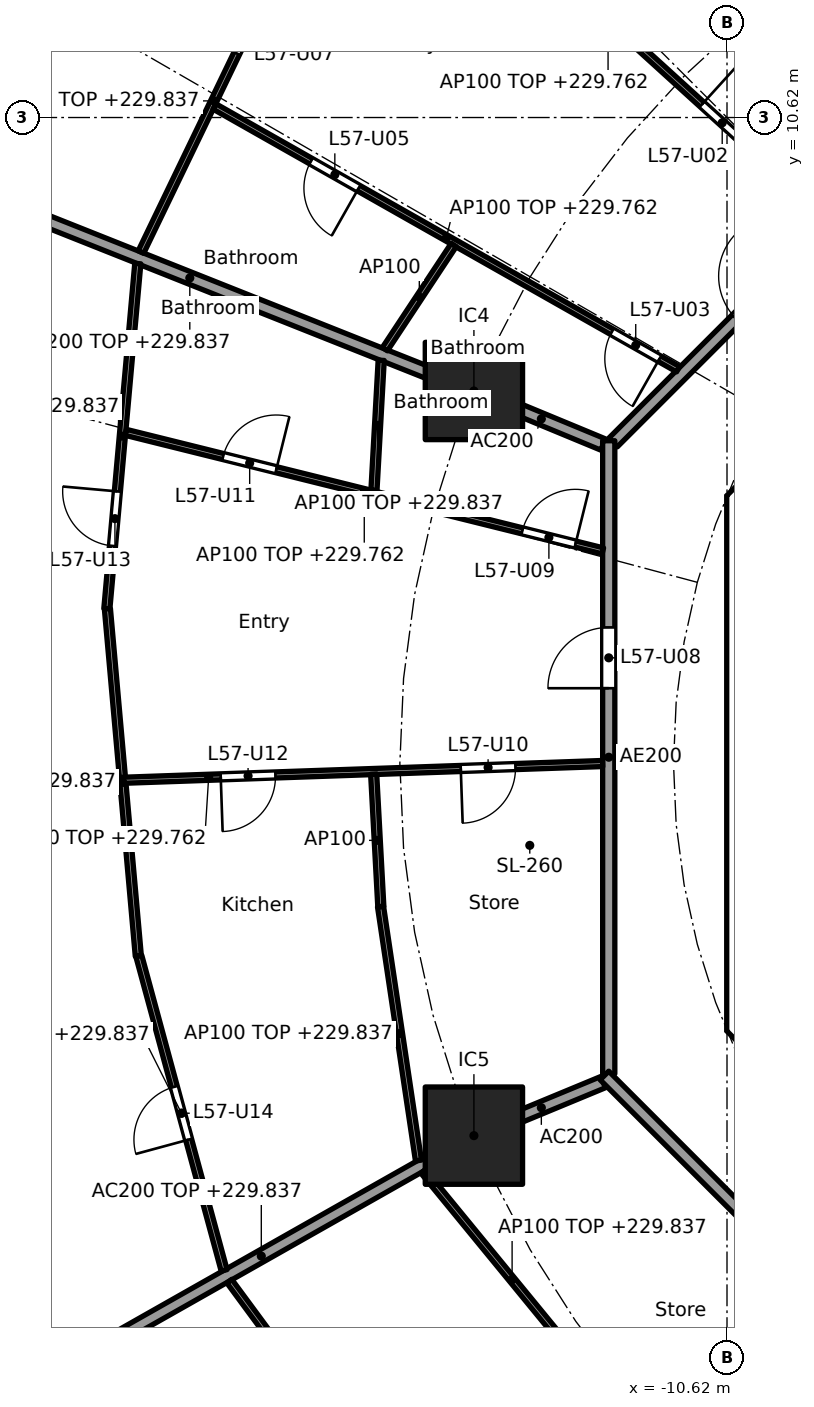
"""IFC4 building model, lengths in metres.
Left out: names, types, materials, properties, quantities, classifications, styles, units other than length and angle.
Written with IfcOpenShell. Run it as: python <this file> out.ifc"""

import sys

from ifc_helpers import new_model, si_unit, direction, frame, frame_2d, origin, origin_2d, place, context, subcontext, project, spatial, polyline, rectangle, outline, extrude, element, fill, save


model = new_model("IFC4")
c1 = context("Model", 3, precision=1e-05, world=origin(), true_north=direction((0.0, 1.0)))
c2 = subcontext(c1, "Body", "Model", "MODEL_VIEW")
j1 = project(units=[si_unit("LENGTHUNIT", "METRE"), si_unit("PLANEANGLEUNIT", "RADIAN")], contexts=[c1])
p1 = place(None, origin())
s1 = spatial("IfcSite", under=j1, at=p1, CompositionType="ELEMENT")
p2 = place(p1, origin())
s2 = spatial("IfcBuilding", under=s1, at=p2, CompositionType="ELEMENT")
p3 = place(p2, frame((0.0, 0.0, 227.0)))
s3 = spatial("IfcBuildingStorey", under=s2, at=p3, CompositionType="ELEMENT", Elevation=227.0)
for number, where, z_axis, x_axis in (
    (1, (-14.782, 6.123, 0.0), (0.0, 0.0, 1.0), (1.0, 0.0, 0.0)),
    (2, (-14.782, -6.123, 0.0), (0.0, 0.0, 1.0), (1.0, 0.0, 0.0)),
):
    element("IfcColumn", number, at=place(p3, frame(where, z_axis=z_axis, x_axis=x_axis)), inside=s3, PredefinedType="COLUMN", context=c2, shape_type="SweptSolid", body=[
        extrude(rectangle(XDim=1.6, YDim=1.6, at=origin_2d()), origin(), (0.0, 0.0, 1.0), 3.7),
    ])
p4 = place(p3, frame((-10.325, 3.801, 0.0), z_axis=(0.0, 0.0, 1.0), x_axis=(0.0, -1.0, 0.0)))
e3 = element("IfcWall", 3, at=p4, inside=s3, PredefinedType="SHEAR", context=c2, shape_type="SweptSolid", body=[
    extrude(rectangle(XDim=7.602, YDim=0.6, at=frame_2d((3.801, 0.0))), origin(), (0.0, 0.0, 1.0), 3.44),
])
p5 = place(p4, frame((0.651, 0.0, 0.0)))
e4 = element("IfcOpeningElement", 4, at=p5, cuts=e3, PredefinedType="OPENING", context=c2, shape_type="SweptSolid", body=[
    extrude(rectangle(XDim=1.5, YDim=2.1, at=frame_2d((0.75, 1.05))), frame((0.0, 0.31, 0.0), z_axis=(0.0, -1.0, 0.0), x_axis=(1.0, 0.0, 0.0)), (0.0, 0.0, 1.0), 0.62),
])
p6 = place(p4, frame((5.451, 0.0, 0.0)))
e5 = element("IfcOpeningElement", 5, at=p6, cuts=e3, PredefinedType="OPENING", context=c2, shape_type="SweptSolid", body=[
    extrude(rectangle(XDim=1.5, YDim=2.1, at=frame_2d((0.75, 1.05))), frame((0.0, 0.31, 0.0), z_axis=(0.0, -1.0, 0.0), x_axis=(1.0, 0.0, 0.0)), (0.0, 0.0, 1.0), 0.62),
])
p7 = place(p3, origin())
e6 = element("IfcWall", 6, at=p7, inside=s3, PredefinedType="SHEAR", context=c2, shape_type="SweptSolid", body=[
    extrude(outline(polyline([(-10.625, -3.801), (-10.025, -3.801), (-10.025, -4.152), (-9.776, -4.401), (-10.2, -4.825), (-10.625, -4.401), (-10.625, -3.801)])), origin(), (0.0, 0.0, 1.0), 3.44),
])
p8 = place(p3, origin())
e7 = element("IfcWall", 7, at=p8, inside=s3, PredefinedType="SHEAR", context=c2, shape_type="SweptSolid", body=[
    extrude(outline(polyline([(-10.2, 4.825), (-9.776, 4.401), (-10.025, 4.152), (-10.025, 3.801), (-10.625, 3.801), (-10.625, 4.401), (-10.2, 4.825)])), origin(), (0.0, 0.0, 1.0), 3.44),
])
p9 = place(p3, frame((-12.657, 5.243, 0.0), z_axis=(0.0, 0.0, 1.0), x_axis=(-0.923859888513, 0.38273085373, 0.0)))
e8 = element("IfcWall", 8, at=p9, inside=s3, PredefinedType="PARTITIONING", context=c2, shape_type="SweptSolid", body=[
    extrude(rectangle(XDim=2.199, YDim=0.2, at=frame_2d((1.1, 0.0))), origin(), (0.0, 0.0, 1.0), 3.44),
])
p10 = place(p3, frame((-14.829, 6.141, 0.0), z_axis=(0.0, 0.0, 1.0), x_axis=(-0.929202069098, 0.36957206981, 0.0)))
e9 = element("IfcWall", 9, at=p10, inside=s3, PredefinedType="PARTITIONING", context=c2, shape_type="SweptSolid", body=[
    extrude(rectangle(XDim=9.957, YDim=0.2, at=frame_2d((4.978, 0.0))), origin(), (0.0, 0.0, 1.0), 2.837),
])
p11 = place(p3, frame((-12.657, -5.243, 0.0), z_axis=(0.0, 0.0, 1.0), x_axis=(-0.923859888513, -0.38273085373, 0.0)))
e10 = element("IfcWall", 10, at=p11, inside=s3, PredefinedType="PARTITIONING", context=c2, shape_type="SweptSolid", body=[
    extrude(rectangle(XDim=2.199, YDim=0.2, at=frame_2d((1.1, 0.0))), origin(), (0.0, 0.0, 1.0), 3.44),
])
p12 = place(p3, frame((-14.825, -6.148, 0.0), z_axis=(0.0, 0.0, 1.0), x_axis=(-0.870099576105, -0.492875975944, 0.0)))
e11 = element("IfcWall", 11, at=p12, inside=s3, PredefinedType="PARTITIONING", context=c2, shape_type="SweptSolid", body=[
    extrude(rectangle(XDim=7.937, YDim=0.2, at=frame_2d((3.969, 0.0))), origin(), (0.0, 0.0, 1.0), 2.837),
])
p13 = place(p3, frame((-5.275, 12.494, 0.0), z_axis=(0.0, 0.0, 1.0), x_axis=(-0.707106781187, -0.707106781187, 0.0)))
e12 = element("IfcWall", 12, at=p13, inside=s3, PredefinedType="PARTITIONING", context=c2, shape_type="SweptSolid", body=[
    extrude(rectangle(XDim=10.209, YDim=0.2, at=frame_2d((5.104, 0.0))), origin(), (0.0, 0.0, 1.0), 3.44),
])
p14 = place(p13, frame((6.339, 0.0, 0.0)))
e13 = element("IfcOpeningElement", 13, at=p14, cuts=e12, PredefinedType="OPENING", context=c2, shape_type="SweptSolid", body=[
    extrude(rectangle(XDim=1.0, YDim=2.1, at=frame_2d((0.5, 1.05))), frame((0.0, 0.11, 0.0), z_axis=(0.0, -1.0, 0.0), x_axis=(1.0, 0.0, 0.0)), (0.0, 0.0, 1.0), 0.22),
])
p15 = place(p3, frame((-12.565, 5.304, 0.0), z_axis=(0.0, 0.0, 1.0), x_axis=(0.0, -1.0, 0.0)))
e14 = element("IfcWall", 14, at=p15, inside=s3, PredefinedType="PARTITIONING", context=c2, shape_type="SweptSolid", body=[
    extrude(rectangle(XDim=10.409, YDim=0.2, at=frame_2d((5.205, 0.0))), origin(), (0.0, 0.0, 1.0), 3.44),
])
p16 = place(p15, frame((3.07, 0.0, 0.0)))
e15 = element("IfcOpeningElement", 15, at=p16, cuts=e14, PredefinedType="OPENING", context=c2, shape_type="SweptSolid", body=[
    extrude(rectangle(XDim=1.0, YDim=2.1, at=frame_2d((0.5, 1.05))), frame((0.0, 0.11, 0.0), z_axis=(0.0, -1.0, 0.0), x_axis=(1.0, 0.0, 0.0)), (0.0, 0.0, 1.0), 0.22),
])
p17 = place(p3, frame((-12.635, -5.134, 0.0), z_axis=(0.0, 0.0, 1.0), x_axis=(0.707106781187, -0.707106781187, 0.0)))
e16 = element("IfcWall", 16, at=p17, inside=s3, PredefinedType="PARTITIONING", context=c2, shape_type="SweptSolid", body=[
    extrude(rectangle(XDim=10.609, YDim=0.2, at=frame_2d((5.305, 0.0))), origin(), (0.0, 0.0, 1.0), 3.44),
])
p18 = place(p3, frame((-8.959, 8.952, 0.0), z_axis=(0.0, 0.0, 1.0), x_axis=(-0.740140081805, 0.672452719011, 0.0)))
e17 = element("IfcWall", 17, at=p18, inside=s3, PredefinedType="PARTITIONING", context=c2, shape_type="SweptSolid", body=[
    extrude(rectangle(XDim=9.775, YDim=0.1, at=frame_2d((4.887, 0.0))), origin(), (0.0, 0.0, 1.0), 2.762),
])
p19 = place(p18, frame((1.901, 0.0, 0.0)))
e18 = element("IfcOpeningElement", 18, at=p19, cuts=e17, PredefinedType="OPENING", context=c2, shape_type="SweptSolid", body=[
    extrude(rectangle(XDim=0.9, YDim=2.1, at=frame_2d((0.45, 1.05))), frame((0.0, 0.06, 0.0), z_axis=(0.0, -1.0, 0.0), x_axis=(1.0, 0.0, 0.0)), (0.0, 0.0, 1.0), 0.12),
])
p20 = place(p18, frame((6.789, 0.0, 0.0)))
e19 = element("IfcOpeningElement", 19, at=p20, cuts=e17, PredefinedType="OPENING", context=c2, shape_type="SweptSolid", body=[
    extrude(rectangle(XDim=0.9, YDim=2.1, at=frame_2d((0.45, 1.05))), frame((0.0, 0.06, 0.0), z_axis=(0.0, -1.0, 0.0), x_axis=(1.0, 0.0, 0.0)), (0.0, 0.0, 1.0), 0.12),
])
p21 = place(p3, frame((-17.861, 13.379, 0.0), z_axis=(0.0, 0.0, 1.0), x_axis=(-0.434302390612, -0.900767136117, 0.0)))
e20 = element("IfcWall", 20, at=p21, inside=s3, PredefinedType="PARTITIONING", context=c2, shape_type="SweptSolid", body=[
    extrude(rectangle(XDim=5.519, YDim=0.1, at=frame_2d((2.759, 0.0))), origin(), (0.0, 0.0, 1.0), 2.837),
])
p22 = place(p21, frame((0.992, 0.0, 0.0)))
e21 = element("IfcOpeningElement", 21, at=p22, cuts=e20, PredefinedType="OPENING", context=c2, shape_type="SweptSolid", body=[
    extrude(rectangle(XDim=0.9, YDim=2.1, at=frame_2d((0.45, 1.05))), frame((0.0, 0.06, 0.0), z_axis=(0.0, -1.0, 0.0), x_axis=(1.0, 0.0, 0.0)), (0.0, 0.0, 1.0), 0.12),
])
p23 = place(p3, frame((-11.425, 6.48, 0.0), z_axis=(0.0, 0.0, 1.0), x_axis=(-0.869969596547, 0.493105365094, 0.0)))
e22 = element("IfcWall", 22, at=p23, inside=s3, PredefinedType="PARTITIONING", context=c2, shape_type="SweptSolid", body=[
    extrude(rectangle(XDim=8.762, YDim=0.1, at=frame_2d((4.381, 0.0))), origin(), (0.0, 0.0, 1.0), 2.762),
])
p24 = place(p23, frame((0.35, 0.0, 0.0)))
e23 = element("IfcOpeningElement", 23, at=p24, cuts=e22, PredefinedType="OPENING", context=c2, shape_type="SweptSolid", body=[
    extrude(rectangle(XDim=0.9, YDim=2.1, at=frame_2d((0.45, 1.05))), frame((0.0, 0.06, 0.0), z_axis=(0.0, -1.0, 0.0), x_axis=(1.0, 0.0, 0.0)), (0.0, 0.0, 1.0), 0.12),
])
p25 = place(p23, frame((6.038, 0.0, 0.0)))
e24 = element("IfcOpeningElement", 24, at=p25, cuts=e22, PredefinedType="OPENING", context=c2, shape_type="SweptSolid", body=[
    extrude(rectangle(XDim=0.9, YDim=2.1, at=frame_2d((0.45, 1.05))), frame((0.0, 0.06, 0.0), z_axis=(0.0, -1.0, 0.0), x_axis=(1.0, 0.0, 0.0)), (0.0, 0.0, 1.0), 0.12),
])
p26 = place(p3, frame((-15.114, 8.524, 0.0), z_axis=(0.0, 0.0, 1.0), x_axis=(-0.551211457161, -0.834365585037, 0.0)))
e25 = element("IfcWall", 25, at=p26, inside=s3, PredefinedType="PARTITIONING", context=c2, shape_type="SweptSolid", body=[
    extrude(rectangle(XDim=2.054, YDim=0.1, at=frame_2d((1.027, 0.0))), origin(), (0.0, 0.0, 1.0), 3.44),
])
p27 = place(p3, frame((-16.307, 6.627, 0.0), z_axis=(0.0, 0.0, 1.0), x_axis=(-0.055608865939, -0.998452629837, 0.0)))
e26 = element("IfcWall", 26, at=p27, inside=s3, PredefinedType="PARTITIONING", context=c2, shape_type="SweptSolid", body=[
    extrude(rectangle(XDim=2.143, YDim=0.1, at=frame_2d((1.071, 0.0))), origin(), (0.0, 0.0, 1.0), 2.837),
])
p28 = place(p3, frame((-20.31, 8.218, 0.0), z_axis=(0.0, 0.0, 1.0), x_axis=(-0.089284106956, -0.996006198899, 0.0)))
e27 = element("IfcWall", 27, at=p28, inside=s3, PredefinedType="PARTITIONING", context=c2, shape_type="SweptSolid", body=[
    extrude(rectangle(XDim=5.698, YDim=0.1, at=frame_2d((2.849, 0.0))), origin(), (0.0, 0.0, 1.0), 2.837),
])
p29 = place(p28, frame((3.761, 0.0, 0.0)))
e28 = element("IfcOpeningElement", 28, at=p29, cuts=e27, PredefinedType="OPENING", context=c2, shape_type="SweptSolid", body=[
    extrude(rectangle(XDim=0.9, YDim=2.1, at=frame_2d((0.45, 1.05))), frame((0.0, 0.06, 0.0), z_axis=(0.0, -1.0, 0.0), x_axis=(1.0, 0.0, 0.0)), (0.0, 0.0, 1.0), 0.12),
])
p30 = place(p3, frame((-12.662, 3.494, 0.0), z_axis=(0.0, 0.0, 1.0), x_axis=(-0.970505526029, 0.241078874951, 0.0)))
e29 = element("IfcWall", 29, at=p30, inside=s3, PredefinedType="PARTITIONING", context=c2, shape_type="SweptSolid", body=[
    extrude(rectangle(XDim=8.085, YDim=0.1, at=frame_2d((4.043, 0.0))), origin(), (0.0, 0.0, 1.0), 2.762),
])
p31 = place(p30, frame((0.464, 0.0, 0.0)))
e30 = element("IfcOpeningElement", 30, at=p31, cuts=e29, PredefinedType="OPENING", context=c2, shape_type="SweptSolid", body=[
    extrude(rectangle(XDim=0.9, YDim=2.1, at=frame_2d((0.45, 1.05))), frame((0.0, 0.06, 0.0), z_axis=(0.0, -1.0, 0.0), x_axis=(1.0, 0.0, 0.0)), (0.0, 0.0, 1.0), 0.12),
])
p32 = place(p30, frame((5.535, 0.0, 0.0)))
e31 = element("IfcOpeningElement", 31, at=p32, cuts=e29, PredefinedType="OPENING", context=c2, shape_type="SweptSolid", body=[
    extrude(rectangle(XDim=0.9, YDim=2.1, at=frame_2d((0.45, 1.05))), frame((0.0, 0.06, 0.0), z_axis=(0.0, -1.0, 0.0), x_axis=(1.0, 0.0, 0.0)), (0.0, 0.0, 1.0), 0.12),
])
p33 = place(p3, frame((-20.81, 2.542, 0.0), z_axis=(0.0, 0.0, 1.0), x_axis=(0.088651453697, -0.996062708748, 0.0)))
e32 = element("IfcWall", 32, at=p33, inside=s3, PredefinedType="PARTITIONING", context=c2, shape_type="SweptSolid", body=[
    extrude(rectangle(XDim=5.737, YDim=0.1, at=frame_2d((2.868, 0.0))), origin(), (0.0, 0.0, 1.0), 2.837),
])
p34 = place(p3, frame((-12.665, -0.003, 0.0), z_axis=(0.0, 0.0, 1.0), x_axis=(-0.999390583608, -0.034906466382, 0.0)))
e33 = element("IfcWall", 33, at=p34, inside=s3, PredefinedType="PARTITIONING", context=c2, shape_type="SweptSolid", body=[
    extrude(rectangle(XDim=12.967, YDim=0.1, at=frame_2d((6.483, 0.0))), origin(), (0.0, 0.0, 1.0), 2.762),
])
p35 = place(p34, frame((1.435, 0.0, 0.0)))
e34 = element("IfcOpeningElement", 34, at=p35, cuts=e33, PredefinedType="OPENING", context=c2, shape_type="SweptSolid", body=[
    extrude(rectangle(XDim=0.9, YDim=2.1, at=frame_2d((0.45, 1.05))), frame((0.0, 0.06, 0.0), z_axis=(0.0, -1.0, 0.0), x_axis=(1.0, 0.0, 0.0)), (0.0, 0.0, 1.0), 0.12),
])
p36 = place(p34, frame((5.385, 0.0, 0.0)))
e35 = element("IfcOpeningElement", 35, at=p36, cuts=e33, PredefinedType="OPENING", context=c2, shape_type="SweptSolid", body=[
    extrude(rectangle(XDim=0.9, YDim=2.1, at=frame_2d((0.45, 1.05))), frame((0.0, 0.06, 0.0), z_axis=(0.0, -1.0, 0.0), x_axis=(1.0, 0.0, 0.0)), (0.0, 0.0, 1.0), 0.12),
])
p37 = place(p3, frame((-16.431, -0.178, 0.0), z_axis=(0.0, 0.0, 1.0), x_axis=(0.053951127036, -0.998543577362, 0.0)))
e36 = element("IfcWall", 36, at=p37, inside=s3, PredefinedType="PARTITIONING", context=c2, shape_type="SweptSolid", body=[
    extrude(rectangle(XDim=2.181, YDim=0.1, at=frame_2d((1.091, 0.0))), origin(), (0.0, 0.0, 1.0), 3.44),
])
p38 = place(p3, frame((-16.318, -2.356, 0.0), z_axis=(0.0, 0.0, 1.0), x_axis=(0.147684413341, -0.989034536331, 0.0)))
e37 = element("IfcWall", 37, at=p38, inside=s3, PredefinedType="PARTITIONING", context=c2, shape_type="SweptSolid", body=[
    extrude(rectangle(XDim=4.222, YDim=0.1, at=frame_2d((2.111, 0.0))), origin(), (0.0, 0.0, 1.0), 2.837),
])
p39 = place(p3, frame((-20.292, -3.17, 0.0), z_axis=(0.0, 0.0, 1.0), x_axis=(0.26187906236, -0.965100697698, 0.0)))
e38 = element("IfcWall", 38, at=p39, inside=s3, PredefinedType="PARTITIONING", context=c2, shape_type="SweptSolid", body=[
    extrude(rectangle(XDim=5.356, YDim=0.1, at=frame_2d((2.678, 0.0))), origin(), (0.0, 0.0, 1.0), 2.837),
])
p40 = place(p39, frame((2.228, 0.0, 0.0)))
e39 = element("IfcOpeningElement", 39, at=p40, cuts=e38, PredefinedType="OPENING", context=c2, shape_type="SweptSolid", body=[
    extrude(rectangle(XDim=0.9, YDim=2.1, at=frame_2d((0.45, 1.05))), frame((0.0, 0.06, 0.0), z_axis=(0.0, -1.0, 0.0), x_axis=(1.0, 0.0, 0.0)), (0.0, 0.0, 1.0), 0.12),
])
p41 = place(p3, frame((-15.616, -6.708, 0.0), z_axis=(0.0, 0.0, 1.0), x_axis=(0.634076422357, -0.773270386483, 0.0)))
e40 = element("IfcWall", 40, at=p41, inside=s3, PredefinedType="PARTITIONING", context=c2, shape_type="SweptSolid", body=[
    extrude(rectangle(XDim=4.611, YDim=0.1, at=frame_2d((2.306, 0.0))), origin(), (0.0, 0.0, 1.0), 2.837),
])
p42 = place(p3, frame((-18.804, -8.516, 0.0), z_axis=(0.0, 0.0, 1.0), x_axis=(0.593249583583, -0.805018590828, 0.0)))
e41 = element("IfcWall", 41, at=p42, inside=s3, PredefinedType="PARTITIONING", context=c2, shape_type="SweptSolid", body=[
    extrude(rectangle(XDim=5.602, YDim=0.1, at=frame_2d((2.801, 0.0))), origin(), (0.0, 0.0, 1.0), 2.837),
])
p43 = place(p19, frame((0.9, 0.0, 0.0), x_axis=(-1.0, 0.0, 0.0)))
e42 = element("IfcDoor", 42, at=p43, inside=s3, OperationType="SINGLE_SWING_LEFT", PredefinedType="DOOR", context=c2, shape_type="SweptSolid", body=[
    extrude(rectangle(XDim=0.9, YDim=2.1, at=frame_2d((0.45, 1.05))), frame((0.0, 0.025, 0.0), z_axis=(0.0, -1.0, 0.0), x_axis=(1.0, 0.0, 0.0)), (0.0, 0.0, 1.0), 0.05),
])
fill(e18, e42)
p44 = place(p24, origin())
e43 = element("IfcDoor", 43, at=p44, inside=s3, OperationType="SINGLE_SWING_LEFT", PredefinedType="DOOR", context=c2, shape_type="SweptSolid", body=[
    extrude(rectangle(XDim=0.9, YDim=2.1, at=frame_2d((0.45, 1.05))), frame((0.0, 0.025, 0.0), z_axis=(0.0, -1.0, 0.0), x_axis=(1.0, 0.0, 0.0)), (0.0, 0.0, 1.0), 0.05),
])
fill(e23, e43)
p45 = place(p25, origin())
e44 = element("IfcDoor", 44, at=p45, inside=s3, OperationType="SINGLE_SWING_LEFT", PredefinedType="DOOR", context=c2, shape_type="SweptSolid", body=[
    extrude(rectangle(XDim=0.9, YDim=2.1, at=frame_2d((0.45, 1.05))), frame((0.0, 0.025, 0.0), z_axis=(0.0, -1.0, 0.0), x_axis=(1.0, 0.0, 0.0)), (0.0, 0.0, 1.0), 0.05),
])
fill(e24, e44)
p46 = place(p22, frame((0.9, 0.0, 0.0), x_axis=(-1.0, 0.0, 0.0)))
e45 = element("IfcDoor", 45, at=p46, inside=s3, OperationType="SINGLE_SWING_RIGHT", PredefinedType="DOOR", context=c2, shape_type="SweptSolid", body=[
    extrude(rectangle(XDim=0.9, YDim=2.1, at=frame_2d((0.45, 1.05))), frame((0.0, 0.025, 0.0), z_axis=(0.0, -1.0, 0.0), x_axis=(1.0, 0.0, 0.0)), (0.0, 0.0, 1.0), 0.05),
])
fill(e21, e45)
p47 = place(p16, frame((1.0, 0.0, 0.0), x_axis=(-1.0, 0.0, 0.0)))
e46 = element("IfcDoor", 46, at=p47, inside=s3, OperationType="SINGLE_SWING_LEFT", PredefinedType="DOOR", context=c2, shape_type="SweptSolid", body=[
    extrude(rectangle(XDim=1.0, YDim=2.1, at=frame_2d((0.5, 1.05))), frame((0.0, 0.025, 0.0), z_axis=(0.0, -1.0, 0.0), x_axis=(1.0, 0.0, 0.0)), (0.0, 0.0, 1.0), 0.05),
])
fill(e15, e46)
p48 = place(p31, frame((0.9, 0.0, 0.0), x_axis=(-1.0, 0.0, 0.0)))
e47 = element("IfcDoor", 47, at=p48, inside=s3, OperationType="SINGLE_SWING_RIGHT", PredefinedType="DOOR", context=c2, shape_type="SweptSolid", body=[
    extrude(rectangle(XDim=0.9, YDim=2.1, at=frame_2d((0.45, 1.05))), frame((0.0, 0.025, 0.0), z_axis=(0.0, -1.0, 0.0), x_axis=(1.0, 0.0, 0.0)), (0.0, 0.0, 1.0), 0.05),
])
fill(e30, e47)
p49 = place(p35, origin())
e48 = element("IfcDoor", 48, at=p49, inside=s3, OperationType="SINGLE_SWING_RIGHT", PredefinedType="DOOR", context=c2, shape_type="SweptSolid", body=[
    extrude(rectangle(XDim=0.9, YDim=2.1, at=frame_2d((0.45, 1.05))), frame((0.0, 0.025, 0.0), z_axis=(0.0, -1.0, 0.0), x_axis=(1.0, 0.0, 0.0)), (0.0, 0.0, 1.0), 0.05),
])
fill(e34, e48)
p50 = place(p32, frame((0.9, 0.0, 0.0), x_axis=(-1.0, 0.0, 0.0)))
e49 = element("IfcDoor", 49, at=p50, inside=s3, OperationType="SINGLE_SWING_RIGHT", PredefinedType="DOOR", context=c2, shape_type="SweptSolid", body=[
    extrude(rectangle(XDim=0.9, YDim=2.1, at=frame_2d((0.45, 1.05))), frame((0.0, 0.025, 0.0), z_axis=(0.0, -1.0, 0.0), x_axis=(1.0, 0.0, 0.0)), (0.0, 0.0, 1.0), 0.05),
])
fill(e31, e49)
p51 = place(p36, origin())
e50 = element("IfcDoor", 50, at=p51, inside=s3, OperationType="SINGLE_SWING_RIGHT", PredefinedType="DOOR", context=c2, shape_type="SweptSolid", body=[
    extrude(rectangle(XDim=0.9, YDim=2.1, at=frame_2d((0.45, 1.05))), frame((0.0, 0.025, 0.0), z_axis=(0.0, -1.0, 0.0), x_axis=(1.0, 0.0, 0.0)), (0.0, 0.0, 1.0), 0.05),
])
fill(e35, e50)
p52 = place(p29, frame((0.9, 0.0, 0.0), x_axis=(-1.0, 0.0, 0.0)))
e51 = element("IfcDoor", 51, at=p52, inside=s3, OperationType="SINGLE_SWING_RIGHT", PredefinedType="DOOR", context=c2, shape_type="SweptSolid", body=[
    extrude(rectangle(XDim=0.9, YDim=2.1, at=frame_2d((0.45, 1.05))), frame((0.0, 0.025, 0.0), z_axis=(0.0, -1.0, 0.0), x_axis=(1.0, 0.0, 0.0)), (0.0, 0.0, 1.0), 0.05),
])
fill(e28, e51)
p53 = place(p40, frame((0.9, 0.0, 0.0), x_axis=(-1.0, 0.0, 0.0)))
e52 = element("IfcDoor", 52, at=p53, inside=s3, OperationType="SINGLE_SWING_LEFT", PredefinedType="DOOR", context=c2, shape_type="SweptSolid", body=[
    extrude(rectangle(XDim=0.9, YDim=2.1, at=frame_2d((0.45, 1.05))), frame((0.0, 0.025, 0.0), z_axis=(0.0, -1.0, 0.0), x_axis=(1.0, 0.0, 0.0)), (0.0, 0.0, 1.0), 0.05),
])
fill(e39, e52)
save(model, sys.argv[1])
